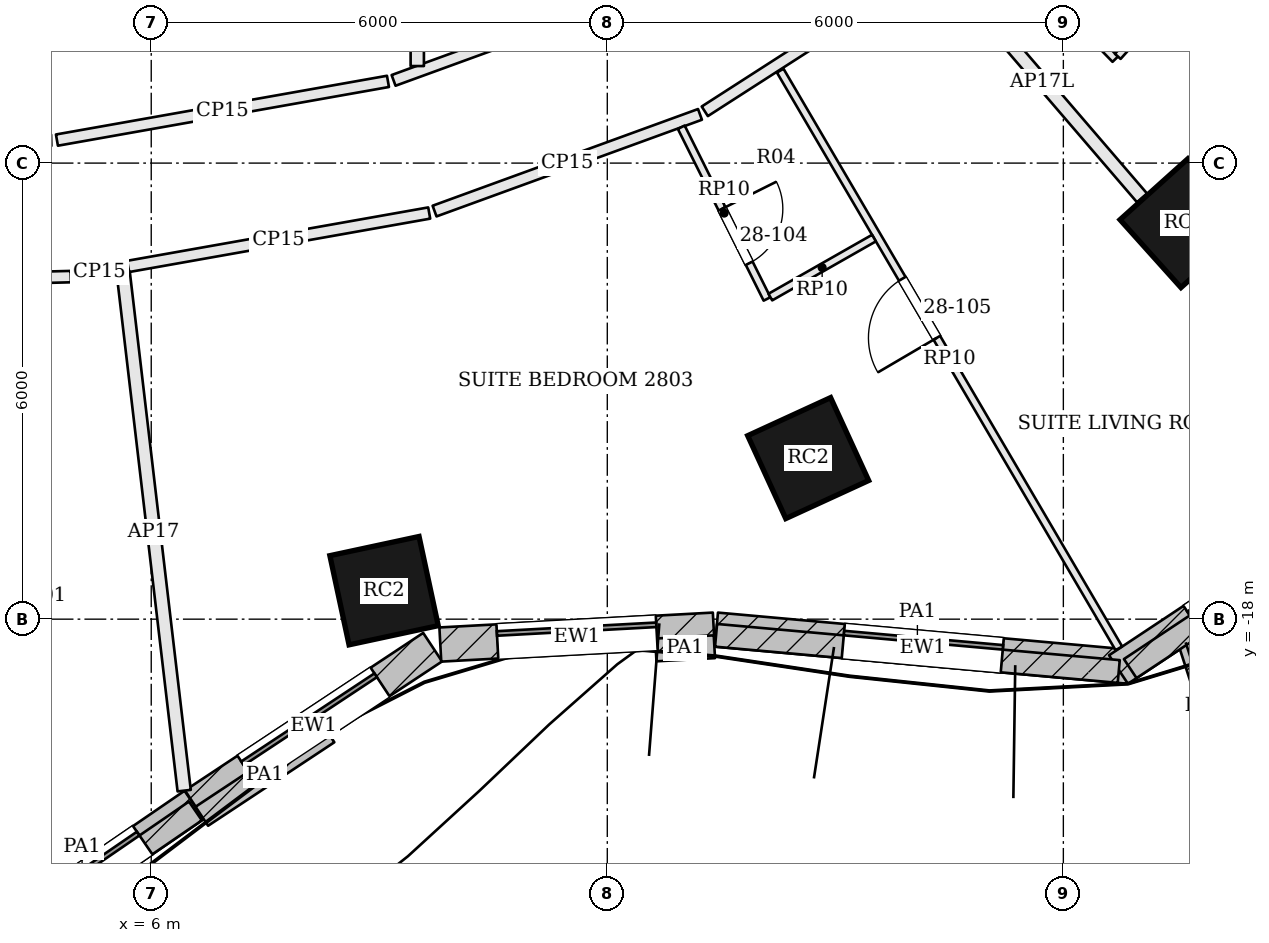
"""IFC4 building model, lengths in metres.
Left out: names, types, materials, properties, quantities, classifications, styles, units other than length and angle.
Written with IfcOpenShell. Run it as: python <this file> out.ifc"""

import sys

from ifc_helpers import new_model, si_unit, direction, frame, frame_2d, origin, origin_2d, place, context, subcontext, project, spatial, rectangle, extrude, element, fill, save


model = new_model("IFC4")
c1 = context("Model", 3, precision=1e-05, world=origin(), true_north=direction((0.0, 1.0)))
c2 = subcontext(c1, "Body", "Model", "MODEL_VIEW")
j1 = project(units=[si_unit("LENGTHUNIT", "METRE"), si_unit("PLANEANGLEUNIT", "RADIAN")], contexts=[c1])
p1 = place(None, origin())
s1 = spatial("IfcSite", under=j1, at=p1, CompositionType="ELEMENT")
p2 = place(p1, origin())
s2 = spatial("IfcBuilding", under=s1, at=p2, CompositionType="ELEMENT")
p3 = place(p2, frame((0.0, 0.0, 117.6)))
s3 = spatial("IfcBuildingStorey", under=s2, at=p3, CompositionType="ELEMENT", Elevation=117.6)
for number, where, z_axis, x_axis in (
    (1, (9.063, -17.625, 0.0), (0.0, 0.0, 1.0), (0.978, 0.21, 0.0)),
    (2, (14.643, -15.881, 0.0), (0.0, 0.0, 1.0), (0.909, 0.417, 0.0)),
    (3, (19.593, -12.79, 0.0), (0.0, 0.0, 1.0), (0.744, 0.668, 0.0)),
):
    element("IfcColumn", number, at=place(p3, frame(where, z_axis=z_axis, x_axis=x_axis)), inside=s3, PredefinedType="COLUMN", context=c2, shape_type="SweptSolid", body=[
        extrude(rectangle(XDim=1.2, YDim=1.2, at=origin_2d()), origin(), (0.0, 0.0, 1.0), 2.8),
    ])
p4 = place(p3, frame((3.479, -22.56, 0.0), z_axis=(0.0, 0.0, 1.0), x_axis=(0.824722766417, 0.565537230033, 0.0)))
e4 = element("IfcWall", 4, at=p4, inside=s3, PredefinedType="SOLIDWALL", context=c2, shape_type="SweptSolid", body=[
    extrude(rectangle(XDim=3.742, YDim=0.45, at=frame_2d((1.871, 0.0))), origin(), (0.0, 0.0, 1.0), 3.3),
])
p5 = place(p4, frame((0.821, 0.0, 0.9)))
e5 = element("IfcOpeningElement", 5, at=p5, cuts=e4, PredefinedType="OPENING", context=c2, shape_type="SweptSolid", body=[
    extrude(rectangle(XDim=2.1, YDim=1.8, at=frame_2d((1.05, 0.9))), frame((0.0, 0.235, 0.0), z_axis=(0.0, -1.0, 0.0), x_axis=(1.0, 0.0, 0.0)), (0.0, 0.0, 1.0), 0.47),
])
p6 = place(p3, frame((6.568, -20.441, 0.0), z_axis=(0.0, 0.0, 1.0), x_axis=(0.834034214531, 0.551712723246, 0.0)))
e6 = element("IfcWall", 6, at=p6, inside=s3, PredefinedType="SOLIDWALL", context=c2, shape_type="SweptSolid", body=[
    extrude(rectangle(XDim=3.757, YDim=0.45, at=frame_2d((1.879, 0.0))), origin(), (0.0, 0.0, 1.0), 3.3),
])
p7 = place(p6, frame((0.829, 0.0, 0.9)))
e7 = element("IfcOpeningElement", 7, at=p7, cuts=e6, PredefinedType="OPENING", context=c2, shape_type="SweptSolid", body=[
    extrude(rectangle(XDim=2.1, YDim=1.8, at=frame_2d((1.05, 0.9))), frame((0.0, 0.235, 0.0), z_axis=(0.0, -1.0, 0.0), x_axis=(1.0, 0.0, 0.0)), (0.0, 0.0, 1.0), 0.47),
])
p8 = place(p3, frame((9.803, -18.334, 0.0), z_axis=(0.0, 0.0, 1.0), x_axis=(0.998525941495, 0.054276552602, 0.0)))
e8 = element("IfcWall", 8, at=p8, inside=s3, PredefinedType="SOLIDWALL", context=c2, shape_type="SweptSolid", body=[
    extrude(rectangle(XDim=3.603, YDim=0.45, at=frame_2d((1.802, 0.0))), origin(), (0.0, 0.0, 1.0), 3.3),
])
p9 = place(p8, frame((0.751, 0.0, 0.9)))
e9 = element("IfcOpeningElement", 9, at=p9, cuts=e8, PredefinedType="OPENING", context=c2, shape_type="SweptSolid", body=[
    extrude(rectangle(XDim=2.1, YDim=1.8, at=frame_2d((1.05, 0.9))), frame((0.0, 0.235, 0.0), z_axis=(0.0, -1.0, 0.0), x_axis=(1.0, 0.0, 0.0)), (0.0, 0.0, 1.0), 0.47),
])
p10 = place(p3, frame((13.436, -18.138, 0.0), z_axis=(0.0, 0.0, 1.0), x_axis=(0.99598810213, -0.089485755376, 0.0)))
e10 = element("IfcWall", 10, at=p10, inside=s3, PredefinedType="SOLIDWALL", context=c2, shape_type="SweptSolid", body=[
    extrude(rectangle(XDim=5.451, YDim=0.45, at=frame_2d((2.726, 0.0))), origin(), (0.0, 0.0, 1.0), 3.3),
])
p11 = place(p10, frame((1.676, 0.0, 0.9)))
e11 = element("IfcOpeningElement", 11, at=p11, cuts=e10, PredefinedType="OPENING", context=c2, shape_type="SweptSolid", body=[
    extrude(rectangle(XDim=2.1, YDim=1.8, at=frame_2d((1.05, 0.9))), frame((0.0, 0.235, 0.0), z_axis=(0.0, -1.0, 0.0), x_axis=(1.0, 0.0, 0.0)), (0.0, 0.0, 1.0), 0.47),
])
p12 = place(p3, frame((18.726, -18.663, 0.0), z_axis=(0.0, 0.0, 1.0), x_axis=(0.83333921474, 0.552761931736, 0.0)))
e12 = element("IfcWall", 12, at=p12, inside=s3, PredefinedType="SOLIDWALL", context=c2, shape_type="SweptSolid", body=[
    extrude(rectangle(XDim=4.451, YDim=0.45, at=frame_2d((2.225, 0.0))), origin(), (0.0, 0.0, 1.0), 3.3),
])
p13 = place(p12, frame((1.175, 0.0, 0.9)))
e13 = element("IfcOpeningElement", 13, at=p13, cuts=e12, PredefinedType="OPENING", context=c2, shape_type="SweptSolid", body=[
    extrude(rectangle(XDim=2.1, YDim=1.8, at=frame_2d((1.05, 0.9))), frame((0.0, 0.235, 0.0), z_axis=(0.0, -1.0, 0.0), x_axis=(1.0, 0.0, 0.0)), (0.0, 0.0, 1.0), 0.47),
])
p14 = place(p3, frame((19.609, -18.305, 0.0), z_axis=(0.0, 0.0, 1.0), x_axis=(0.308600224758, -0.951191832008, 0.0)))
e14 = element("IfcWall", 14, at=p14, inside=s3, PredefinedType="SOLIDWALL", context=c2, shape_type="SweptSolid", body=[
    extrude(rectangle(XDim=1.75, YDim=0.2, at=frame_2d((0.875, 0.0))), origin(), (0.0, 0.0, 1.0), 3.3),
])
p15 = place(p3, frame((3.599, -22.568, 3.6), z_axis=(0.0, 0.0, 1.0), x_axis=(0.82476034254, 0.565482428881, 0.0)))
e15 = element("IfcWall", 15, at=p15, inside=s3, PredefinedType="PARAPET", context=c2, shape_type="SweptSolid", body=[
    extrude(rectangle(XDim=3.616, YDim=0.3, at=frame_2d((1.808, 0.0))), origin(), (0.0, 0.0, 1.0), 1.1),
])
p16 = place(p3, frame((6.665, -20.593, 3.6), z_axis=(0.0, 0.0, 1.0), x_axis=(0.834081514068, 0.551641213008, 0.0)))
e16 = element("IfcWall", 16, at=p16, inside=s3, PredefinedType="PARAPET", context=c2, shape_type="SweptSolid", body=[
    extrude(rectangle(XDim=1.991, YDim=0.3, at=frame_2d((0.996, 0.0))), origin(), (0.0, 0.0, 1.0), 1.1),
])
p17 = place(p3, frame((12.639, -18.405, 3.6), z_axis=(0.0, 0.0, 1.0), x_axis=(0.998517272222, 0.054435806917, 0.0)))
e17 = element("IfcWall", 17, at=p17, inside=s3, PredefinedType="PARAPET", context=c2, shape_type="SweptSolid", body=[
    extrude(rectangle(XDim=0.771, YDim=0.3, at=frame_2d((0.386, 0.0))), origin(), (0.0, 0.0, 1.0), 1.1),
])
p18 = place(p3, frame((13.431, -18.212, 3.6), z_axis=(0.0, 0.0, 1.0), x_axis=(0.995986354678, -0.089505202619, 0.0)))
e18 = element("IfcWall", 18, at=p18, inside=s3, PredefinedType="PARAPET", context=c2, shape_type="SweptSolid", body=[
    extrude(rectangle(XDim=5.319, YDim=0.3, at=frame_2d((2.659, 0.0))), origin(), (0.0, 0.0, 1.0), 1.1),
])
p19 = place(p3, frame((18.88, -18.65, 3.6), z_axis=(0.0, 0.0, 1.0), x_axis=(0.833379877726, 0.552700623667, 0.0)))
e19 = element("IfcWall", 19, at=p19, inside=s3, PredefinedType="PARAPET", context=c2, shape_type="SweptSolid", body=[
    extrude(rectangle(XDim=4.173, YDim=0.3, at=frame_2d((2.087, 0.0))), origin(), (0.0, 0.0, 1.0), 1.1),
])
p20 = place(p3, frame((-1.957, -13.672, 0.0), z_axis=(0.0, 0.0, 1.0), x_axis=(0.99966456087, 0.025899145557, 0.0)))
e20 = element("IfcWall", 20, at=p20, inside=s3, PredefinedType="PARTITIONING", context=c2, shape_type="SweptSolid", body=[
    extrude(rectangle(XDim=6.9, YDim=0.15, at=frame_2d((3.45, 0.0))), origin(), (0.0, 0.0, 1.0), 2.684),
])
p21 = place(p20, frame((4.304, 0.0, 0.0)))
e21 = element("IfcOpeningElement", 21, at=p21, cuts=e20, PredefinedType="OPENING", context=c2, shape_type="SweptSolid", body=[
    extrude(rectangle(XDim=1.0, YDim=2.1, at=frame_2d((0.5, 1.05))), frame((0.0, 0.085, 0.0), z_axis=(0.0, -1.0, 0.0), x_axis=(1.0, 0.0, 0.0)), (0.0, 0.0, 1.0), 0.17),
])
p22 = place(p3, frame((5.015, -13.48, 0.0), z_axis=(0.0, 0.0, 1.0), x_axis=(0.984644078065, 0.174573879866, 0.0)))
e22 = element("IfcWall", 22, at=p22, inside=s3, PredefinedType="PARTITIONING", context=c2, shape_type="SweptSolid", body=[
    extrude(rectangle(XDim=0.618, YDim=0.15, at=frame_2d((0.309, 0.0))), origin(), (0.0, 0.0, 1.0), 2.684),
])
p23 = place(p3, frame((6.433, -20.256, 0.0), z_axis=(0.0, 0.0, 1.0), x_axis=(-0.116866039573, 0.993147687303, 0.0)))
e23 = element("IfcWall", 23, at=p23, inside=s3, PredefinedType="PARTITIONING", context=c2, shape_type="SweptSolid", body=[
    extrude(rectangle(XDim=6.856, YDim=0.175, at=frame_2d((3.428, 0.0))), origin(), (0.0, 0.0, 1.0), 2.684),
])
p24 = place(p3, frame((5.697, -13.359, 0.0), z_axis=(0.0, 0.0, 1.0), x_axis=(0.984641449362, 0.174588705818, 0.0)))
e24 = element("IfcWall", 24, at=p24, inside=s3, PredefinedType="PARTITIONING", context=c2, shape_type="SweptSolid", body=[
    extrude(rectangle(XDim=4.022, YDim=0.15, at=frame_2d((2.011, 0.0))), origin(), (0.0, 0.0, 1.0), 2.684),
])
p25 = place(p3, frame((9.728, -12.631, 0.0), z_axis=(0.0, 0.0, 1.0), x_axis=(0.939626438181, 0.342201923826, 0.0)))
e25 = element("IfcWall", 25, at=p25, inside=s3, PredefinedType="PARTITIONING", context=c2, shape_type="SweptSolid", body=[
    extrude(rectangle(XDim=3.716, YDim=0.15, at=frame_2d((1.858, 0.0))), origin(), (0.0, 0.0, 1.0), 2.684),
])
p26 = place(p3, frame((13.283, -11.319, 0.0), z_axis=(0.0, 0.0, 1.0), x_axis=(0.841150270113, 0.540801463653, 0.0)))
e26 = element("IfcWall", 26, at=p26, inside=s3, PredefinedType="PARTITIONING", context=c2, shape_type="SweptSolid", body=[
    extrude(rectangle(XDim=3.656, YDim=0.15, at=frame_2d((1.828, 0.0))), origin(), (0.0, 0.0, 1.0), 2.684),
])
p27 = place(p26, frame((1.894, 0.0, 0.0)))
e27 = element("IfcOpeningElement", 27, at=p27, cuts=e26, PredefinedType="OPENING", context=c2, shape_type="SweptSolid", body=[
    extrude(rectangle(XDim=1.0, YDim=2.1, at=frame_2d((0.5, 1.05))), frame((0.0, 0.085, 0.0), z_axis=(0.0, -1.0, 0.0), x_axis=(1.0, 0.0, 0.0)), (0.0, 0.0, 1.0), 0.17),
])
p28 = place(p3, frame((19.035, -12.458, 0.0), z_axis=(0.0, 0.0, 1.0), x_axis=(-0.651603524635, 0.7585597186, 0.0)))
e28 = element("IfcWall", 28, at=p28, inside=s3, PredefinedType="PARTITIONING", context=c2, shape_type="SweptSolid", body=[
    extrude(rectangle(XDim=4.033, YDim=0.175, at=frame_2d((2.017, 0.0))), origin(), (0.0, 0.0, 1.0), 2.28),
])
p29 = place(p3, frame((12.353, -9.76, 0.0), z_axis=(0.0, 0.0, 1.0), x_axis=(-0.939632450309, -0.342185415127, 0.0)))
e29 = element("IfcWall", 29, at=p29, inside=s3, PredefinedType="PARTITIONING", context=c2, shape_type="SweptSolid", body=[
    extrude(rectangle(XDim=3.368, YDim=0.15, at=frame_2d((1.684, 0.0))), origin(), (0.0, 0.0, 1.0), 2.684),
])
p30 = place(p3, frame((9.115, -10.925, 0.0), z_axis=(0.0, 0.0, 1.0), x_axis=(-0.984632605417, -0.174638576352, 0.0)))
e30 = element("IfcWall", 30, at=p30, inside=s3, PredefinedType="PARTITIONING", context=c2, shape_type="SweptSolid", body=[
    extrude(rectangle(XDim=4.423, YDim=0.15, at=frame_2d((2.211, 0.0))), origin(), (0.0, 0.0, 1.0), 2.684),
])
p31 = place(p3, frame((18.73, -18.384, 0.0), z_axis=(0.0, 0.0, 1.0), x_axis=(-0.50573941389, 0.862686295961, 0.0)))
e31 = element("IfcWall", 31, at=p31, inside=s3, PredefinedType="PARTITIONING", context=c2, shape_type="SweptSolid", body=[
    extrude(rectangle(XDim=8.81, YDim=0.1, at=frame_2d((4.405, 0.0))), origin(), (0.0, 0.0, 1.0), 2.684),
])
p32 = place(p31, frame((4.735, 0.0, 0.0)))
e32 = element("IfcOpeningElement", 32, at=p32, cuts=e31, PredefinedType="OPENING", context=c2, shape_type="SweptSolid", body=[
    extrude(rectangle(XDim=0.9, YDim=2.4, at=frame_2d((0.45, 1.2))), frame((0.0, 0.06, 0.0), z_axis=(0.0, -1.0, 0.0), x_axis=(1.0, 0.0, 0.0)), (0.0, 0.0, 1.0), 0.12),
])
p33 = place(p3, frame((12.973, -11.528, 0.0), z_axis=(0.0, 0.0, 1.0), x_axis=(0.446788124497, -0.894639800036, 0.0)))
e33 = element("IfcWall", 33, at=p33, inside=s3, PredefinedType="PARTITIONING", context=c2, shape_type="SweptSolid", body=[
    extrude(rectangle(XDim=2.525, YDim=0.1, at=frame_2d((1.263, 0.0))), origin(), (0.0, 0.0, 1.0), 2.684),
])
p34 = place(p33, frame((1.2, 0.0, 0.0)))
e34 = element("IfcOpeningElement", 34, at=p34, cuts=e33, PredefinedType="OPENING", context=c2, shape_type="SweptSolid", body=[
    extrude(rectangle(XDim=0.8, YDim=2.1, at=frame_2d((0.4, 1.05))), frame((0.0, 0.06, 0.0), z_axis=(0.0, -1.0, 0.0), x_axis=(1.0, 0.0, 0.0)), (0.0, 0.0, 1.0), 0.12),
])
p35 = place(p3, frame((14.145, -13.763, 0.0), z_axis=(0.0, 0.0, 1.0), x_axis=(0.869036936982, 0.494747210363, 0.0)))
e35 = element("IfcWall", 35, at=p35, inside=s3, PredefinedType="PARTITIONING", context=c2, shape_type="SweptSolid", body=[
    extrude(rectangle(XDim=1.569, YDim=0.1, at=frame_2d((0.784, 0.0))), origin(), (0.0, 0.0, 1.0), 2.684),
])
p36 = place(p3, frame((23.302, -12.023, 0.0), z_axis=(0.0, 0.0, 1.0), x_axis=(-0.779049211338, 0.626962779049, 0.0)))
e36 = element("IfcWall", 36, at=p36, inside=s3, PredefinedType="PARTITIONING", context=c2, shape_type="SweptSolid", body=[
    extrude(rectangle(XDim=6.898, YDim=0.1, at=frame_2d((3.449, 0.0))), origin(), (0.0, 0.0, 1.0), 2.684),
])
p37 = place(p36, frame((2.823, 0.0, 0.0)))
e37 = element("IfcOpeningElement", 37, at=p37, cuts=e36, PredefinedType="OPENING", context=c2, shape_type="SweptSolid", body=[
    extrude(rectangle(XDim=0.9, YDim=2.4, at=frame_2d((0.45, 1.2))), frame((0.0, 0.06, 0.0), z_axis=(0.0, -1.0, 0.0), x_axis=(1.0, 0.0, 0.0)), (0.0, 0.0, 1.0), 0.12),
])
p38 = place(p3, frame((16.922, -8.823, 0.0), z_axis=(0.0, 0.0, 1.0), x_axis=(0.697371069569, -0.71671025619, 0.0)))
e38 = element("IfcWall", 38, at=p38, inside=s3, PredefinedType="PARTITIONING", context=c2, shape_type="SweptSolid", body=[
    extrude(rectangle(XDim=2.525, YDim=0.1, at=frame_2d((1.262, 0.0))), origin(), (0.0, 0.0, 1.0), 2.684),
])
p39 = place(p38, frame((1.2, 0.0, 0.0)))
e39 = element("IfcOpeningElement", 39, at=p39, cuts=e38, PredefinedType="OPENING", context=c2, shape_type="SweptSolid", body=[
    extrude(rectangle(XDim=0.8, YDim=2.1, at=frame_2d((0.4, 1.05))), frame((0.0, 0.06, 0.0), z_axis=(0.0, -1.0, 0.0), x_axis=(1.0, 0.0, 0.0)), (0.0, 0.0, 1.0), 0.12),
])
p40 = place(p3, frame((18.716, -10.596, 0.0), z_axis=(0.0, 0.0, 1.0), x_axis=(0.667863253754, 0.744284001094, 0.0)))
e40 = element("IfcWall", 40, at=p40, inside=s3, PredefinedType="PARTITIONING", context=c2, shape_type="SweptSolid", body=[
    extrude(rectangle(XDim=1.716, YDim=0.1, at=frame_2d((0.858, 0.0))), origin(), (0.0, 0.0, 1.0), 2.684),
])
p41 = place(p3, frame((9.5, -10.723, 0.0), z_axis=(0.0, 0.0, 1.0), x_axis=(0.0, 1.0, 0.0)))
e41 = element("IfcWall", 41, at=p41, inside=s3, PredefinedType="PARTITIONING", context=c2, shape_type="SweptSolid", body=[
    extrude(rectangle(XDim=5.848, YDim=0.175, at=frame_2d((2.924, 0.0))), origin(), (0.0, 0.0, 1.0), 2.684),
])
p42 = place(p5, origin())
e42 = element("IfcWindow", 42, at=p42, inside=s3, PartitioningType="SINGLE_PANEL", PredefinedType="WINDOW", context=c2, shape_type="SweptSolid", body=[
    extrude(rectangle(XDim=2.1, YDim=1.8, at=frame_2d((1.05, 0.9))), frame((0.0, 0.135, 0.0), z_axis=(0.0, -1.0, 0.0), x_axis=(1.0, 0.0, 0.0)), (0.0, 0.0, 1.0), 0.06),
])
fill(e5, e42)
p43 = place(p7, origin())
e43 = element("IfcWindow", 43, at=p43, inside=s3, PartitioningType="SINGLE_PANEL", PredefinedType="WINDOW", context=c2, shape_type="SweptSolid", body=[
    extrude(rectangle(XDim=2.1, YDim=1.8, at=frame_2d((1.05, 0.9))), frame((0.0, 0.135, 0.0), z_axis=(0.0, -1.0, 0.0), x_axis=(1.0, 0.0, 0.0)), (0.0, 0.0, 1.0), 0.06),
])
fill(e7, e43)
p44 = place(p9, origin())
e44 = element("IfcWindow", 44, at=p44, inside=s3, PartitioningType="SINGLE_PANEL", PredefinedType="WINDOW", context=c2, shape_type="SweptSolid", body=[
    extrude(rectangle(XDim=2.1, YDim=1.8, at=frame_2d((1.05, 0.9))), frame((0.0, 0.135, 0.0), z_axis=(0.0, -1.0, 0.0), x_axis=(1.0, 0.0, 0.0)), (0.0, 0.0, 1.0), 0.06),
])
fill(e9, e44)
p45 = place(p11, origin())
e45 = element("IfcWindow", 45, at=p45, inside=s3, PartitioningType="SINGLE_PANEL", PredefinedType="WINDOW", context=c2, shape_type="SweptSolid", body=[
    extrude(rectangle(XDim=2.1, YDim=1.8, at=frame_2d((1.05, 0.9))), frame((0.0, 0.135, 0.0), z_axis=(0.0, -1.0, 0.0), x_axis=(1.0, 0.0, 0.0)), (0.0, 0.0, 1.0), 0.06),
])
fill(e11, e45)
p46 = place(p13, origin())
e46 = element("IfcWindow", 46, at=p46, inside=s3, PartitioningType="SINGLE_PANEL", PredefinedType="WINDOW", context=c2, shape_type="SweptSolid", body=[
    extrude(rectangle(XDim=2.1, YDim=1.8, at=frame_2d((1.05, 0.9))), frame((0.0, 0.135, 0.0), z_axis=(0.0, -1.0, 0.0), x_axis=(1.0, 0.0, 0.0)), (0.0, 0.0, 1.0), 0.06),
])
fill(e13, e46)
p47 = place(p34, origin())
e47 = element("IfcDoor", 47, at=p47, inside=s3, OperationType="SINGLE_SWING_LEFT", PredefinedType="DOOR", context=c2, shape_type="SweptSolid", body=[
    extrude(rectangle(XDim=0.8, YDim=2.1, at=frame_2d((0.4, 1.05))), frame((0.0, 0.025, 0.0), z_axis=(0.0, -1.0, 0.0), x_axis=(1.0, 0.0, 0.0)), (0.0, 0.0, 1.0), 0.05),
])
fill(e34, e47)
p48 = place(p32, origin())
e48 = element("IfcDoor", 48, at=p48, inside=s3, OperationType="SINGLE_SWING_LEFT", PredefinedType="DOOR", context=c2, shape_type="SweptSolid", body=[
    extrude(rectangle(XDim=0.9, YDim=2.4, at=frame_2d((0.45, 1.2))), frame((0.0, 0.025, 0.0), z_axis=(0.0, -1.0, 0.0), x_axis=(1.0, 0.0, 0.0)), (0.0, 0.0, 1.0), 0.05),
])
fill(e32, e48)
save(model, sys.argv[1])
